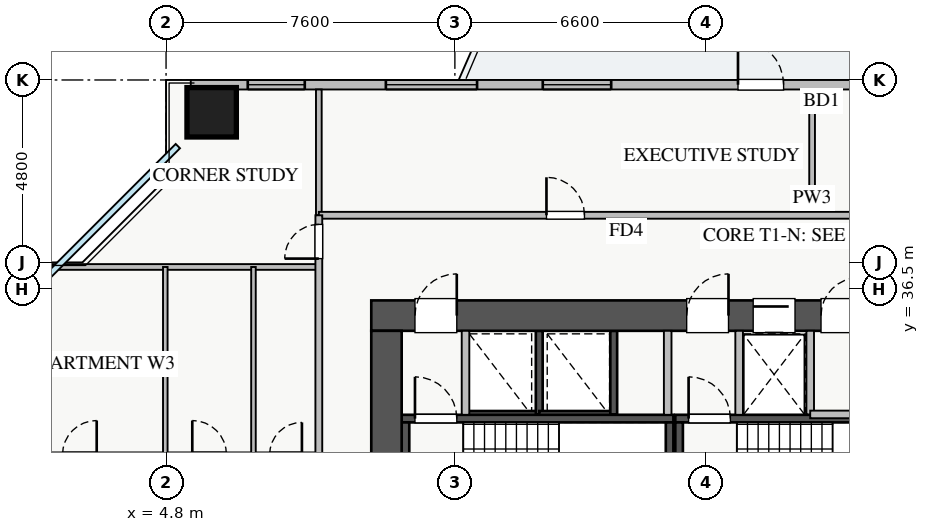
"""IFC4 building model, lengths in metres.
Left out: names, types, materials, properties, quantities, classifications, styles, units other than length and angle.
Written with IfcOpenShell. Run it as: python <this file> out.ifc"""

import sys

from ifc_helpers import new_model, si_unit, direction, frame, frame_2d, origin, origin_2d, place, context, subcontext, project, spatial, rectangle, extrude, source, transform, mapped, element, fill, save


model = new_model("IFC4")
c1 = context("Model", 3, precision=1e-05, world=origin(), true_north=direction((0.0, 1.0)))
c2 = subcontext(c1, "Body", "Model", "MODEL_VIEW")
j1 = project(units=[si_unit("LENGTHUNIT", "METRE"), si_unit("PLANEANGLEUNIT", "RADIAN")], contexts=[c1])
p1 = place(None, origin())
s1 = spatial("IfcSite", under=j1, at=p1, CompositionType="ELEMENT")
p2 = place(p1, origin())
s2 = spatial("IfcBuilding", under=s1, at=p2, CompositionType="ELEMENT")
p3 = place(p2, frame((0.0, 0.0, 50.25)))
s3 = spatial("IfcBuildingStorey", under=s2, at=p3, CompositionType="ELEMENT", Elevation=50.25)
p4 = place(p3, frame((12.68, 33.2, 0.0), z_axis=(0.0, 0.0, 1.0), x_axis=(1.0, 0.0, 0.0)))
e1 = element("IfcWall", 1, at=p4, inside=s3, PredefinedType="SHEAR", context=c2, shape_type="SweptSolid", body=[
    extrude(rectangle(XDim=1.94, YDim=0.18, at=frame_2d((0.97, 0.0))), origin(), (0.0, 0.0, 1.0), 3.07),
])
p5 = place(p3, frame((14.62, 33.2, 0.0), z_axis=(0.0, 0.0, 1.0), x_axis=(0.0, 1.0, 0.0)))
e2 = element("IfcWall", 2, at=p5, inside=s3, PredefinedType="SHEAR", context=c2, shape_type="SweptSolid", body=[
    extrude(rectangle(XDim=2.2, YDim=0.18, at=frame_2d((1.1, 0.0))), origin(), (0.0, 0.0, 1.0), 3.07),
])
p6 = place(p3, frame((14.62, 33.2, 0.0), z_axis=(0.0, 0.0, 1.0), x_axis=(1.0, 0.0, 0.0)))
e3 = element("IfcWall", 3, at=p6, inside=s3, PredefinedType="SHEAR", context=c2, shape_type="SweptSolid", body=[
    extrude(rectangle(XDim=1.96, YDim=0.18, at=frame_2d((0.98, 0.0))), origin(), (0.0, 0.0, 1.0), 3.07),
])
p7 = place(p3, frame((16.58, 33.2, 0.0), z_axis=(0.0, 0.0, 1.0), x_axis=(0.0, 1.0, 0.0)))
e4 = element("IfcWall", 4, at=p7, inside=s3, PredefinedType="SHEAR", context=c2, shape_type="SweptSolid", body=[
    extrude(rectangle(XDim=2.2, YDim=0.18, at=frame_2d((1.1, 0.0))), origin(), (0.0, 0.0, 1.0), 3.07),
])
p8 = place(p3, frame((19.88, 33.2, 0.0), z_axis=(0.0, 0.0, 1.0), x_axis=(1.0, 0.0, 0.0)))
e5 = element("IfcWall", 5, at=p8, inside=s3, PredefinedType="SHEAR", context=c2, shape_type="SweptSolid", body=[
    extrude(rectangle(XDim=1.87, YDim=0.18, at=frame_2d((0.935, 0.0))), origin(), (0.0, 0.0, 1.0), 3.07),
])
p9 = place(p3, frame((11.0, 33.09, 0.0), z_axis=(0.0, 0.0, 1.0), x_axis=(1.0, 0.0, 0.0)))
e6 = element("IfcWall", 6, at=p9, inside=s3, PredefinedType="SHEAR", context=c2, shape_type="SweptSolid", body=[
    extrude(rectangle(XDim=7.15, YDim=0.2, at=frame_2d((3.575, 0.0))), origin(), (0.0, 0.0, 1.0), 3.25),
])
p10 = place(p9, frame((0.35, 0.0, 0.0)))
e7 = element("IfcOpeningElement", 7, at=p10, cuts=e6, PredefinedType="OPENING", context=c2, shape_type="SweptSolid", body=[
    extrude(rectangle(XDim=1.1, YDim=2.05, at=frame_2d((0.55, 1.025))), frame((0.0, 0.11, 0.0), z_axis=(0.0, -1.0, 0.0), x_axis=(1.0, 0.0, 0.0)), (0.0, 0.0, 1.0), 0.22),
])
for number, where, z_axis, x_axis in (
    (8, (11.1, 30.05, 0.0), (0.0, 0.0, 1.0), (0.0, 1.0, 0.0)),
    (9, (18.05, 30.05, 0.0), (0.0, 0.0, 1.0), (0.0, 1.0, 0.0)),
):
    element("IfcWall", number, at=place(p3, frame(where, z_axis=z_axis, x_axis=x_axis)), inside=s3, PredefinedType="SHEAR", context=c2, shape_type="SweptSolid", body=[
        extrude(rectangle(XDim=2.94, YDim=0.2, at=frame_2d((1.47, 0.0))), origin(), (0.0, 0.0, 1.0), 3.25),
    ])
p11 = place(p3, frame((18.2, 33.09, 0.0), z_axis=(0.0, 0.0, 1.0), x_axis=(1.0, 0.0, 0.0)))
e10 = element("IfcWall", 10, at=p11, inside=s3, PredefinedType="SHEAR", context=c2, shape_type="SweptSolid", body=[
    extrude(rectangle(XDim=7.15, YDim=0.2, at=frame_2d((3.575, 0.0))), origin(), (0.0, 0.0, 1.0), 3.25),
])
p12 = place(p11, frame((0.35, 0.0, 0.0)))
e11 = element("IfcOpeningElement", 11, at=p12, cuts=e10, PredefinedType="OPENING", context=c2, shape_type="SweptSolid", body=[
    extrude(rectangle(XDim=1.1, YDim=2.05, at=frame_2d((0.55, 1.025))), frame((0.0, 0.11, 0.0), z_axis=(0.0, -1.0, 0.0), x_axis=(1.0, 0.0, 0.0)), (0.0, 0.0, 1.0), 0.22),
])
p13 = place(p3, frame((18.3, 30.05, 0.0), z_axis=(0.0, 0.0, 1.0), x_axis=(0.0, 1.0, 0.0)))
e12 = element("IfcWall", 12, at=p13, inside=s3, PredefinedType="SHEAR", context=c2, shape_type="SweptSolid", body=[
    extrude(rectangle(XDim=2.94, YDim=0.2, at=frame_2d((1.47, 0.0))), origin(), (0.0, 0.0, 1.0), 3.25),
])
p14 = place(p3, frame((10.2, 35.8, 0.0), z_axis=(0.0, 0.0, 1.0), x_axis=(1.0, 0.0, 0.0)))
e13 = element("IfcWall", 13, at=p14, inside=s3, PredefinedType="SHEAR", context=c2, shape_type="SweptSolid", body=[
    extrude(rectangle(XDim=17.6, YDim=0.8, at=frame_2d((8.8, 0.0))), origin(), (0.0, 0.0, 1.0), 3.25),
])
p15 = place(p14, frame((1.15, 0.0, 0.0)))
e14 = element("IfcOpeningElement", 14, at=p15, cuts=e13, PredefinedType="OPENING", context=c2, shape_type="SweptSolid", body=[
    extrude(rectangle(XDim=1.1, YDim=2.05, at=frame_2d((0.55, 1.025))), frame((0.0, 0.41, 0.0), z_axis=(0.0, -1.0, 0.0), x_axis=(1.0, 0.0, 0.0)), (0.0, 0.0, 1.0), 0.82),
])
p16 = place(p14, frame((8.3, 0.0, 0.0)))
e15 = element("IfcOpeningElement", 15, at=p16, cuts=e13, PredefinedType="OPENING", context=c2, shape_type="SweptSolid", body=[
    extrude(rectangle(XDim=1.1, YDim=2.05, at=frame_2d((0.55, 1.025))), frame((0.0, 0.41, 0.0), z_axis=(0.0, -1.0, 0.0), x_axis=(1.0, 0.0, 0.0)), (0.0, 0.0, 1.0), 0.82),
])
p17 = place(p14, frame((10.05, 0.0, 0.0)))
e16 = element("IfcOpeningElement", 16, at=p17, cuts=e13, PredefinedType="OPENING", context=c2, shape_type="SweptSolid", body=[
    extrude(rectangle(XDim=1.1, YDim=2.05, at=frame_2d((0.55, 1.025))), frame((0.0, 0.41, 0.0), z_axis=(0.0, -1.0, 0.0), x_axis=(1.0, 0.0, 0.0)), (0.0, 0.0, 1.0), 0.82),
])
p18 = place(p14, frame((14.74, 0.0, 0.0)))
e17 = element("IfcOpeningElement", 17, at=p18, cuts=e13, PredefinedType="OPENING", context=c2, shape_type="SweptSolid", body=[
    extrude(rectangle(XDim=1.0, YDim=2.05, at=frame_2d((0.5, 1.025))), frame((0.0, 0.41, 0.0), z_axis=(0.0, -1.0, 0.0), x_axis=(1.0, 0.0, 0.0)), (0.0, 0.0, 1.0), 0.82),
])
p19 = place(p14, frame((11.835, 0.0, 0.0)))
e18 = element("IfcOpeningElement", 18, at=p19, cuts=e13, PredefinedType="OPENING", context=c2, shape_type="SweptSolid", body=[
    extrude(rectangle(XDim=1.0, YDim=2.05, at=frame_2d((0.5, 1.025))), frame((0.0, 0.41, 0.0), z_axis=(0.0, -1.0, 0.0), x_axis=(1.0, 0.0, 0.0)), (0.0, 0.0, 1.0), 0.82),
])
p20 = place(p14, frame((13.37, 0.0, 0.0)))
e19 = element("IfcOpeningElement", 19, at=p20, cuts=e13, PredefinedType="OPENING", context=c2, shape_type="SweptSolid", body=[
    extrude(rectangle(XDim=1.0, YDim=2.05, at=frame_2d((0.5, 1.025))), frame((0.0, 0.41, 0.0), z_axis=(0.0, -1.0, 0.0), x_axis=(1.0, 0.0, 0.0)), (0.0, 0.0, 1.0), 0.82),
])
p21 = place(p3, frame((10.6, 29.8, 0.0), z_axis=(0.0, 0.0, 1.0), x_axis=(0.0, 1.0, 0.0)))
e20 = element("IfcWall", 20, at=p21, inside=s3, PredefinedType="SHEAR", context=c2, shape_type="SweptSolid", body=[
    extrude(rectangle(XDim=5.6, YDim=0.8, at=frame_2d((2.8, 0.0))), origin(), (0.0, 0.0, 1.0), 3.25),
])
m1 = source(origin(), c2, "Body", "SweptSolid", [
    extrude(rectangle(XDim=1.3, YDim=1.3, at=origin_2d()), origin(), (0.0, 0.0, 1.0), 3.25),
])
p22 = place(p3, frame((6.0, 41.15, 0.0), z_axis=(0.0, 0.0, 1.0), x_axis=(1.0, 0.0, 0.0)))
e21 = element("IfcColumn", 21, at=p22, inside=s3, PredefinedType="COLUMN", context=c2, shape_type="MappedRepresentation", body=[
    mapped(m1, transform((0.0, 0.0, 0.0), x_axis=(1.0, 0.0, 0.0), y_axis=(0.0, 1.0, 0.0), z_axis=(0.0, 0.0, 1.0), scale=1.0)),
])
p23 = place(p3, frame((5.45, 41.875, 0.0), z_axis=(0.0, 0.0, 1.0), x_axis=(1.0, 0.0, 0.0)))
e22 = element("IfcWall", 22, at=p23, inside=s3, PredefinedType="STANDARD", context=c2, shape_type="SweptSolid", body=[
    extrude(rectangle(XDim=27.1, YDim=0.25, at=frame_2d((13.55, 0.0))), origin(), (0.0, 0.0, 1.0), 2.61),
])
p24 = place(p23, frame((14.4, 0.0, 0.0)))
e23 = element("IfcOpeningElement", 23, at=p24, cuts=e22, PredefinedType="OPENING", context=c2, shape_type="SweptSolid", body=[
    extrude(rectangle(XDim=1.2, YDim=2.1, at=frame_2d((0.6, 1.05))), frame((0.0, 0.135, 0.0), z_axis=(0.0, -1.0, 0.0), x_axis=(1.0, 0.0, 0.0)), (0.0, 0.0, 1.0), 0.27),
])
p25 = place(p23, frame((1.5, 0.0, 0.9)))
e24 = element("IfcOpeningElement", 24, at=p25, cuts=e22, PredefinedType="OPENING", context=c2, shape_type="SweptSolid", body=[
    extrude(rectangle(XDim=1.5, YDim=1.5, at=frame_2d((0.75, 0.75))), frame((0.0, 0.135, 0.0), z_axis=(0.0, -1.0, 0.0), x_axis=(1.0, 0.0, 0.0)), (0.0, 0.0, 1.0), 0.27),
])
p26 = place(p23, frame((9.263, 0.0, 0.9)))
e25 = element("IfcOpeningElement", 25, at=p26, cuts=e22, PredefinedType="OPENING", context=c2, shape_type="SweptSolid", body=[
    extrude(rectangle(XDim=1.8, YDim=1.45, at=frame_2d((0.9, 0.725))), frame((0.0, 0.135, 0.0), z_axis=(0.0, -1.0, 0.0), x_axis=(1.0, 0.0, 0.0)), (0.0, 0.0, 1.0), 0.27),
])
p27 = place(p23, frame((18.774, 0.0, 0.9)))
e26 = element("IfcOpeningElement", 26, at=p27, cuts=e22, PredefinedType="OPENING", context=c2, shape_type="SweptSolid", body=[
    extrude(rectangle(XDim=1.5, YDim=1.5, at=frame_2d((0.75, 0.75))), frame((0.0, 0.135, 0.0), z_axis=(0.0, -1.0, 0.0), x_axis=(1.0, 0.0, 0.0)), (0.0, 0.0, 1.0), 0.27),
])
p28 = place(p23, frame((22.663, 0.0, 0.9)))
e27 = element("IfcOpeningElement", 27, at=p28, cuts=e22, PredefinedType="OPENING", context=c2, shape_type="SweptSolid", body=[
    extrude(rectangle(XDim=2.1, YDim=1.48, at=frame_2d((1.05, 0.74))), frame((0.0, 0.135, 0.0), z_axis=(0.0, -1.0, 0.0), x_axis=(1.0, 0.0, 0.0)), (0.0, 0.0, 1.0), 0.27),
])
p29 = place(p23, frame((5.134, 0.0, 0.9)))
e28 = element("IfcOpeningElement", 28, at=p29, cuts=e22, PredefinedType="OPENING", context=c2, shape_type="SweptSolid", body=[
    extrude(rectangle(XDim=2.4, YDim=1.5, at=frame_2d((1.2, 0.75))), frame((0.0, 0.135, 0.0), z_axis=(0.0, -1.0, 0.0), x_axis=(1.0, 0.0, 0.0)), (0.0, 0.0, 1.0), 0.27),
])
for number, where, z_axis, x_axis in (
    (29, (12.68, 33.19, 0.0), (0.0, 0.0, 1.0), (0.0, 1.0, 0.0)),
    (30, (18.0, 33.19, 0.0), (0.0, 0.0, 1.0), (0.0, 1.0, 0.0)),
    (31, (19.88, 33.19, 0.0), (0.0, 0.0, 1.0), (0.0, 1.0, 0.0)),
):
    element("IfcWall", number, at=place(p3, frame(where, z_axis=z_axis, x_axis=x_axis)), inside=s3, PredefinedType="PARTITIONING", context=c2, shape_type="SweptSolid", body=[
        extrude(rectangle(XDim=2.21, YDim=0.2, at=frame_2d((1.105, 0.0))), origin(), (0.0, 0.0, 1.0), 3.07),
    ])
p30 = place(p3, frame((21.75, 33.2, 0.0), z_axis=(0.0, 0.0, 1.0), x_axis=(0.0, 1.0, 0.0)))
e32 = element("IfcWall", 32, at=p30, inside=s3, PredefinedType="PARTITIONING", context=c2, shape_type="SweptSolid", body=[
    extrude(rectangle(XDim=2.2, YDim=0.2, at=frame_2d((1.1, 0.0))), origin(), (0.0, 0.0, 1.0), 3.07),
])
p31 = place(p3, frame((21.75, 33.2, 0.0), z_axis=(0.0, 0.0, 1.0), x_axis=(1.0, 0.0, 0.0)))
e33 = element("IfcWall", 33, at=p31, inside=s3, PredefinedType="PARTITIONING", context=c2, shape_type="SweptSolid", body=[
    extrude(rectangle(XDim=5.17, YDim=0.2, at=frame_2d((2.585, 0.0))), origin(), (0.0, 0.0, 1.0), 3.07),
])
for number, where, z_axis, x_axis in (
    (34, (21.8, 38.44, 0.0), (0.0, 0.0, 1.0), (0.0, 1.0, 0.0)),
    (35, (8.82, 38.44, 0.0), (0.0, 0.0, 1.0), (0.0, 1.0, 0.0)),
):
    element("IfcWall", number, at=place(p3, frame(where, z_axis=z_axis, x_axis=x_axis)), inside=s3, PredefinedType="PARTITIONING", context=c2, shape_type="SweptSolid", body=[
        extrude(rectangle(XDim=3.31, YDim=0.15, at=frame_2d((1.655, 0.0))), origin(), (0.0, 0.0, 1.0), 3.07),
    ])
p32 = place(p3, frame((8.82, 38.44, 0.0), z_axis=(0.0, 0.0, 1.0), x_axis=(1.0, 0.0, 0.0)))
e36 = element("IfcWall", 36, at=p32, inside=s3, PredefinedType="PARTITIONING", context=c2, shape_type="SweptSolid", body=[
    extrude(rectangle(XDim=23.58, YDim=0.18, at=frame_2d((11.79, 0.0))), origin(), (0.0, 0.0, 1.0), 3.07),
])
p33 = place(p32, frame((5.99, 0.0, 0.0)))
e37 = element("IfcOpeningElement", 37, at=p33, cuts=e36, PredefinedType="OPENING", context=c2, shape_type="SweptSolid", body=[
    extrude(rectangle(XDim=1.0, YDim=2.05, at=frame_2d((0.5, 1.025))), frame((0.0, 0.1, 0.0), z_axis=(0.0, -1.0, 0.0), x_axis=(1.0, 0.0, 0.0)), (0.0, 0.0, 1.0), 0.2),
])
p34 = place(p32, frame((17.78, 0.0, 0.0)))
e38 = element("IfcOpeningElement", 38, at=p34, cuts=e36, PredefinedType="OPENING", context=c2, shape_type="SweptSolid", body=[
    extrude(rectangle(XDim=1.0, YDim=2.05, at=frame_2d((0.5, 1.025))), frame((0.0, 0.1, 0.0), z_axis=(0.0, -1.0, 0.0), x_axis=(1.0, 0.0, 0.0)), (0.0, 0.0, 1.0), 0.2),
])
p35 = place(p3, frame((0.25, 37.08, 0.0), z_axis=(0.0, 0.0, 1.0), x_axis=(1.0, 0.0, 0.0)))
e39 = element("IfcWall", 39, at=p35, inside=s3, PredefinedType="PARTITIONING", context=c2, shape_type="SweptSolid", body=[
    extrude(rectangle(XDim=8.57, YDim=0.15, at=frame_2d((4.285, 0.0))), origin(), (0.0, 0.0, 1.0), 3.07),
])
for number, where, z_axis, x_axis in (
    (40, (4.78, 32.14, 0.0), (0.0, 0.0, 1.0), (0.0, 1.0, 0.0)),
    (41, (7.1, 32.14, 0.0), (0.0, 0.0, 1.0), (0.0, 1.0, 0.0)),
):
    element("IfcWall", number, at=place(p3, frame(where, z_axis=z_axis, x_axis=x_axis)), inside=s3, PredefinedType="PLUMBINGWALL", context=c2, shape_type="SweptSolid", body=[
        extrude(rectangle(XDim=4.94, YDim=0.12, at=frame_2d((2.47, 0.0))), origin(), (0.0, 0.0, 1.0), 3.07),
    ])
p36 = place(p3, frame((8.82, 7.21, 0.0), z_axis=(0.0, 0.0, 1.0), x_axis=(0.0, 1.0, 0.0)))
e42 = element("IfcWall", 42, at=p36, inside=s3, PredefinedType="PARTITIONING", context=c2, shape_type="SweptSolid", body=[
    extrude(rectangle(XDim=31.23, YDim=0.18, at=frame_2d((15.615, 0.0))), origin(), (0.0, 0.0, 1.0), 3.07),
])
p37 = place(p36, frame((30.09, 0.0, 0.0)))
e43 = element("IfcOpeningElement", 43, at=p37, cuts=e42, PredefinedType="OPENING", context=c2, shape_type="SweptSolid", body=[
    extrude(rectangle(XDim=0.9, YDim=2.05, at=frame_2d((0.45, 1.025))), frame((0.0, 0.1, 0.0), z_axis=(0.0, -1.0, 0.0), x_axis=(1.0, 0.0, 0.0)), (0.0, 0.0, 1.0), 0.2),
])
p38 = place(p36, frame((0.24, 0.0, 0.0)))
e44 = element("IfcOpeningElement", 44, at=p38, cuts=e42, PredefinedType="OPENING", context=c2, shape_type="SweptSolid", body=[
    extrude(rectangle(XDim=0.9, YDim=2.05, at=frame_2d((0.45, 1.025))), frame((0.0, 0.1, 0.0), z_axis=(0.0, -1.0, 0.0), x_axis=(1.0, 0.0, 0.0)), (0.0, 0.0, 1.0), 0.2),
])
p39 = place(p36, frame((2.95, 0.0, 0.0)))
e45 = element("IfcOpeningElement", 45, at=p39, cuts=e42, PredefinedType="OPENING", context=c2, shape_type="SweptSolid", body=[
    extrude(rectangle(XDim=1.0, YDim=2.05, at=frame_2d((0.5, 1.025))), frame((0.0, 0.1, 0.0), z_axis=(0.0, -1.0, 0.0), x_axis=(1.0, 0.0, 0.0)), (0.0, 0.0, 1.0), 0.2),
])
p40 = place(p36, frame((15.115, 0.0, 0.0)))
e46 = element("IfcOpeningElement", 46, at=p40, cuts=e42, PredefinedType="OPENING", context=c2, shape_type="SweptSolid", body=[
    extrude(rectangle(XDim=1.0, YDim=2.05, at=frame_2d((0.5, 1.025))), frame((0.0, 0.1, 0.0), z_axis=(0.0, -1.0, 0.0), x_axis=(1.0, 0.0, 0.0)), (0.0, 0.0, 1.0), 0.2),
])
p41 = place(p36, frame((21.96, 0.0, 0.0)))
e47 = element("IfcOpeningElement", 47, at=p41, cuts=e42, PredefinedType="OPENING", context=c2, shape_type="SweptSolid", body=[
    extrude(rectangle(XDim=1.0, YDim=2.05, at=frame_2d((0.5, 1.025))), frame((0.0, 0.1, 0.0), z_axis=(0.0, -1.0, 0.0), x_axis=(1.0, 0.0, 0.0)), (0.0, 0.0, 1.0), 0.2),
])
m2 = source(origin(), c2, "Body", "SweptSolid", [
    extrude(rectangle(XDim=1.2, YDim=2.1, at=frame_2d((0.6, 1.05))), frame((0.0, 0.025, 0.0), z_axis=(0.0, -1.0, 0.0), x_axis=(1.0, 0.0, 0.0)), (0.0, 0.0, 1.0), 0.05),
])
p42 = place(p24, origin())
e48 = element("IfcDoor", 48, at=p42, inside=s3, OperationType="SINGLE_SWING_LEFT", PredefinedType="DOOR", context=c2, shape_type="MappedRepresentation", body=[
    mapped(m2, transform((0.0, 0.0, 0.0), x_axis=(1.0, 0.0, 0.0), y_axis=(0.0, 1.0, 0.0), z_axis=(0.0, 0.0, 1.0), scale=1.0)),
])
fill(e23, e48)
m3 = source(origin(), c2, "Body", "SweptSolid", [
    extrude(rectangle(XDim=1.5, YDim=1.5, at=frame_2d((0.75, 0.75))), frame((0.0, 0.03, 0.0), z_axis=(0.0, -1.0, 0.0), x_axis=(1.0, 0.0, 0.0)), (0.0, 0.0, 1.0), 0.06),
])
p43 = place(p25, origin())
e49 = element("IfcWindow", 49, at=p43, inside=s3, PartitioningType="TRIPLE_PANEL_VERTICAL", PredefinedType="WINDOW", context=c2, shape_type="MappedRepresentation", body=[
    mapped(m3, transform((0.0, 0.0, 0.0), x_axis=(1.0, 0.0, 0.0), y_axis=(0.0, 1.0, 0.0), z_axis=(0.0, 0.0, 1.0), scale=1.0)),
])
fill(e24, e49)
m4 = source(origin(), c2, "Body", "SweptSolid", [
    extrude(rectangle(XDim=1.8, YDim=1.45, at=frame_2d((0.9, 0.725))), frame((0.0, 0.03, 0.0), z_axis=(0.0, -1.0, 0.0), x_axis=(1.0, 0.0, 0.0)), (0.0, 0.0, 1.0), 0.06),
])
p44 = place(p26, origin())
e50 = element("IfcWindow", 50, at=p44, inside=s3, PartitioningType="DOUBLE_PANEL_VERTICAL", PredefinedType="WINDOW", context=c2, shape_type="MappedRepresentation", body=[
    mapped(m4, transform((0.0, 0.0, 0.0), x_axis=(1.0, 0.0, 0.0), y_axis=(0.0, 1.0, 0.0), z_axis=(0.0, 0.0, 1.0), scale=1.0)),
])
fill(e25, e50)
m5 = source(origin(), c2, "Body", "SweptSolid", [
    extrude(rectangle(XDim=1.1, YDim=2.05, at=frame_2d((0.55, 1.025))), frame((0.0, 0.025, 0.0), z_axis=(0.0, -1.0, 0.0), x_axis=(1.0, 0.0, 0.0)), (0.0, 0.0, 1.0), 0.05),
])
p45 = place(p15, origin())
e51 = element("IfcDoor", 51, at=p45, inside=s3, OperationType="SINGLE_SWING_RIGHT", PredefinedType="DOOR", context=c2, shape_type="MappedRepresentation", body=[
    mapped(m5, transform((0.0, 0.0, 0.0), x_axis=(1.0, 0.0, 0.0), y_axis=(0.0, 1.0, 0.0), z_axis=(0.0, 0.0, 1.0), scale=1.0)),
])
fill(e14, e51)
p46 = place(p10, origin())
e52 = element("IfcDoor", 52, at=p46, inside=s3, OperationType="SINGLE_SWING_LEFT", PredefinedType="DOOR", context=c2, shape_type="MappedRepresentation", body=[
    mapped(m5, transform((0.0, 0.0, 0.0), x_axis=(1.0, 0.0, 0.0), y_axis=(0.0, 1.0, 0.0), z_axis=(0.0, 0.0, 1.0), scale=1.0)),
])
fill(e7, e52)
p47 = place(p16, origin())
e53 = element("IfcDoor", 53, at=p47, inside=s3, OperationType="SINGLE_SWING_RIGHT", PredefinedType="DOOR", context=c2, shape_type="MappedRepresentation", body=[
    mapped(m5, transform((0.0, 0.0, 0.0), x_axis=(1.0, 0.0, 0.0), y_axis=(0.0, 1.0, 0.0), z_axis=(0.0, 0.0, 1.0), scale=1.0)),
])
fill(e15, e53)
p48 = place(p12, origin())
e54 = element("IfcDoor", 54, at=p48, inside=s3, OperationType="SINGLE_SWING_LEFT", PredefinedType="DOOR", context=c2, shape_type="MappedRepresentation", body=[
    mapped(m5, transform((0.0, 0.0, 0.0), x_axis=(1.0, 0.0, 0.0), y_axis=(0.0, 1.0, 0.0), z_axis=(0.0, 0.0, 1.0), scale=1.0)),
])
fill(e11, e54)
p49 = place(p17, origin())
e55 = element("IfcDoor", 55, at=p49, inside=s3, OperationType="SLIDING_TO_LEFT", PredefinedType="DOOR", context=c2, shape_type="MappedRepresentation", body=[
    mapped(m5, transform((0.0, 0.0, 0.0), x_axis=(1.0, 0.0, 0.0), y_axis=(0.0, 1.0, 0.0), z_axis=(0.0, 0.0, 1.0), scale=1.0)),
])
fill(e16, e55)
m6 = source(origin(), c2, "Body", "SweptSolid", [
    extrude(rectangle(XDim=1.0, YDim=2.05, at=frame_2d((0.5, 1.025))), frame((0.0, 0.025, 0.0), z_axis=(0.0, -1.0, 0.0), x_axis=(1.0, 0.0, 0.0)), (0.0, 0.0, 1.0), 0.05),
])
p50 = place(p19, origin())
e56 = element("IfcDoor", 56, at=p50, inside=s3, OperationType="SINGLE_SWING_RIGHT", PredefinedType="DOOR", context=c2, shape_type="MappedRepresentation", body=[
    mapped(m6, transform((0.0, 0.0, 0.0), x_axis=(1.0, 0.0, 0.0), y_axis=(0.0, 1.0, 0.0), z_axis=(0.0, 0.0, 1.0), scale=1.0)),
])
fill(e18, e56)
p51 = place(p33, origin())
e57 = element("IfcDoor", 57, at=p51, inside=s3, OperationType="SINGLE_SWING_LEFT", PredefinedType="DOOR", context=c2, shape_type="MappedRepresentation", body=[
    mapped(m6, transform((0.0, 0.0, 0.0), x_axis=(1.0, 0.0, 0.0), y_axis=(0.0, 1.0, 0.0), z_axis=(0.0, 0.0, 1.0), scale=1.0)),
])
fill(e37, e57)
m7 = source(origin(), c2, "Body", "SweptSolid", [
    extrude(rectangle(XDim=0.9, YDim=2.05, at=frame_2d((0.45, 1.025))), frame((0.0, 0.025, 0.0), z_axis=(0.0, -1.0, 0.0), x_axis=(1.0, 0.0, 0.0)), (0.0, 0.0, 1.0), 0.05),
])
p52 = place(p37, origin())
e58 = element("IfcDoor", 58, at=p52, inside=s3, OperationType="SINGLE_SWING_LEFT", PredefinedType="DOOR", context=c2, shape_type="MappedRepresentation", body=[
    mapped(m7, transform((0.0, 0.0, 0.0), x_axis=(1.0, 0.0, 0.0), y_axis=(0.0, 1.0, 0.0), z_axis=(0.0, 0.0, 1.0), scale=1.0)),
])
fill(e43, e58)
m8 = source(origin(), c2, "Body", "SweptSolid", [
    extrude(rectangle(XDim=2.4, YDim=1.5, at=frame_2d((1.2, 0.75))), frame((0.0, 0.03, 0.0), z_axis=(0.0, -1.0, 0.0), x_axis=(1.0, 0.0, 0.0)), (0.0, 0.0, 1.0), 0.06),
])
p53 = place(p29, origin())
e59 = element("IfcWindow", 59, at=p53, inside=s3, PartitioningType="TRIPLE_PANEL_VERTICAL", PredefinedType="WINDOW", context=c2, shape_type="MappedRepresentation", body=[
    mapped(m8, transform((0.0, 0.0, 0.0), x_axis=(1.0, 0.0, 0.0), y_axis=(0.0, 1.0, 0.0), z_axis=(0.0, 0.0, 1.0), scale=1.0)),
])
fill(e28, e59)
save(model, sys.argv[1])
